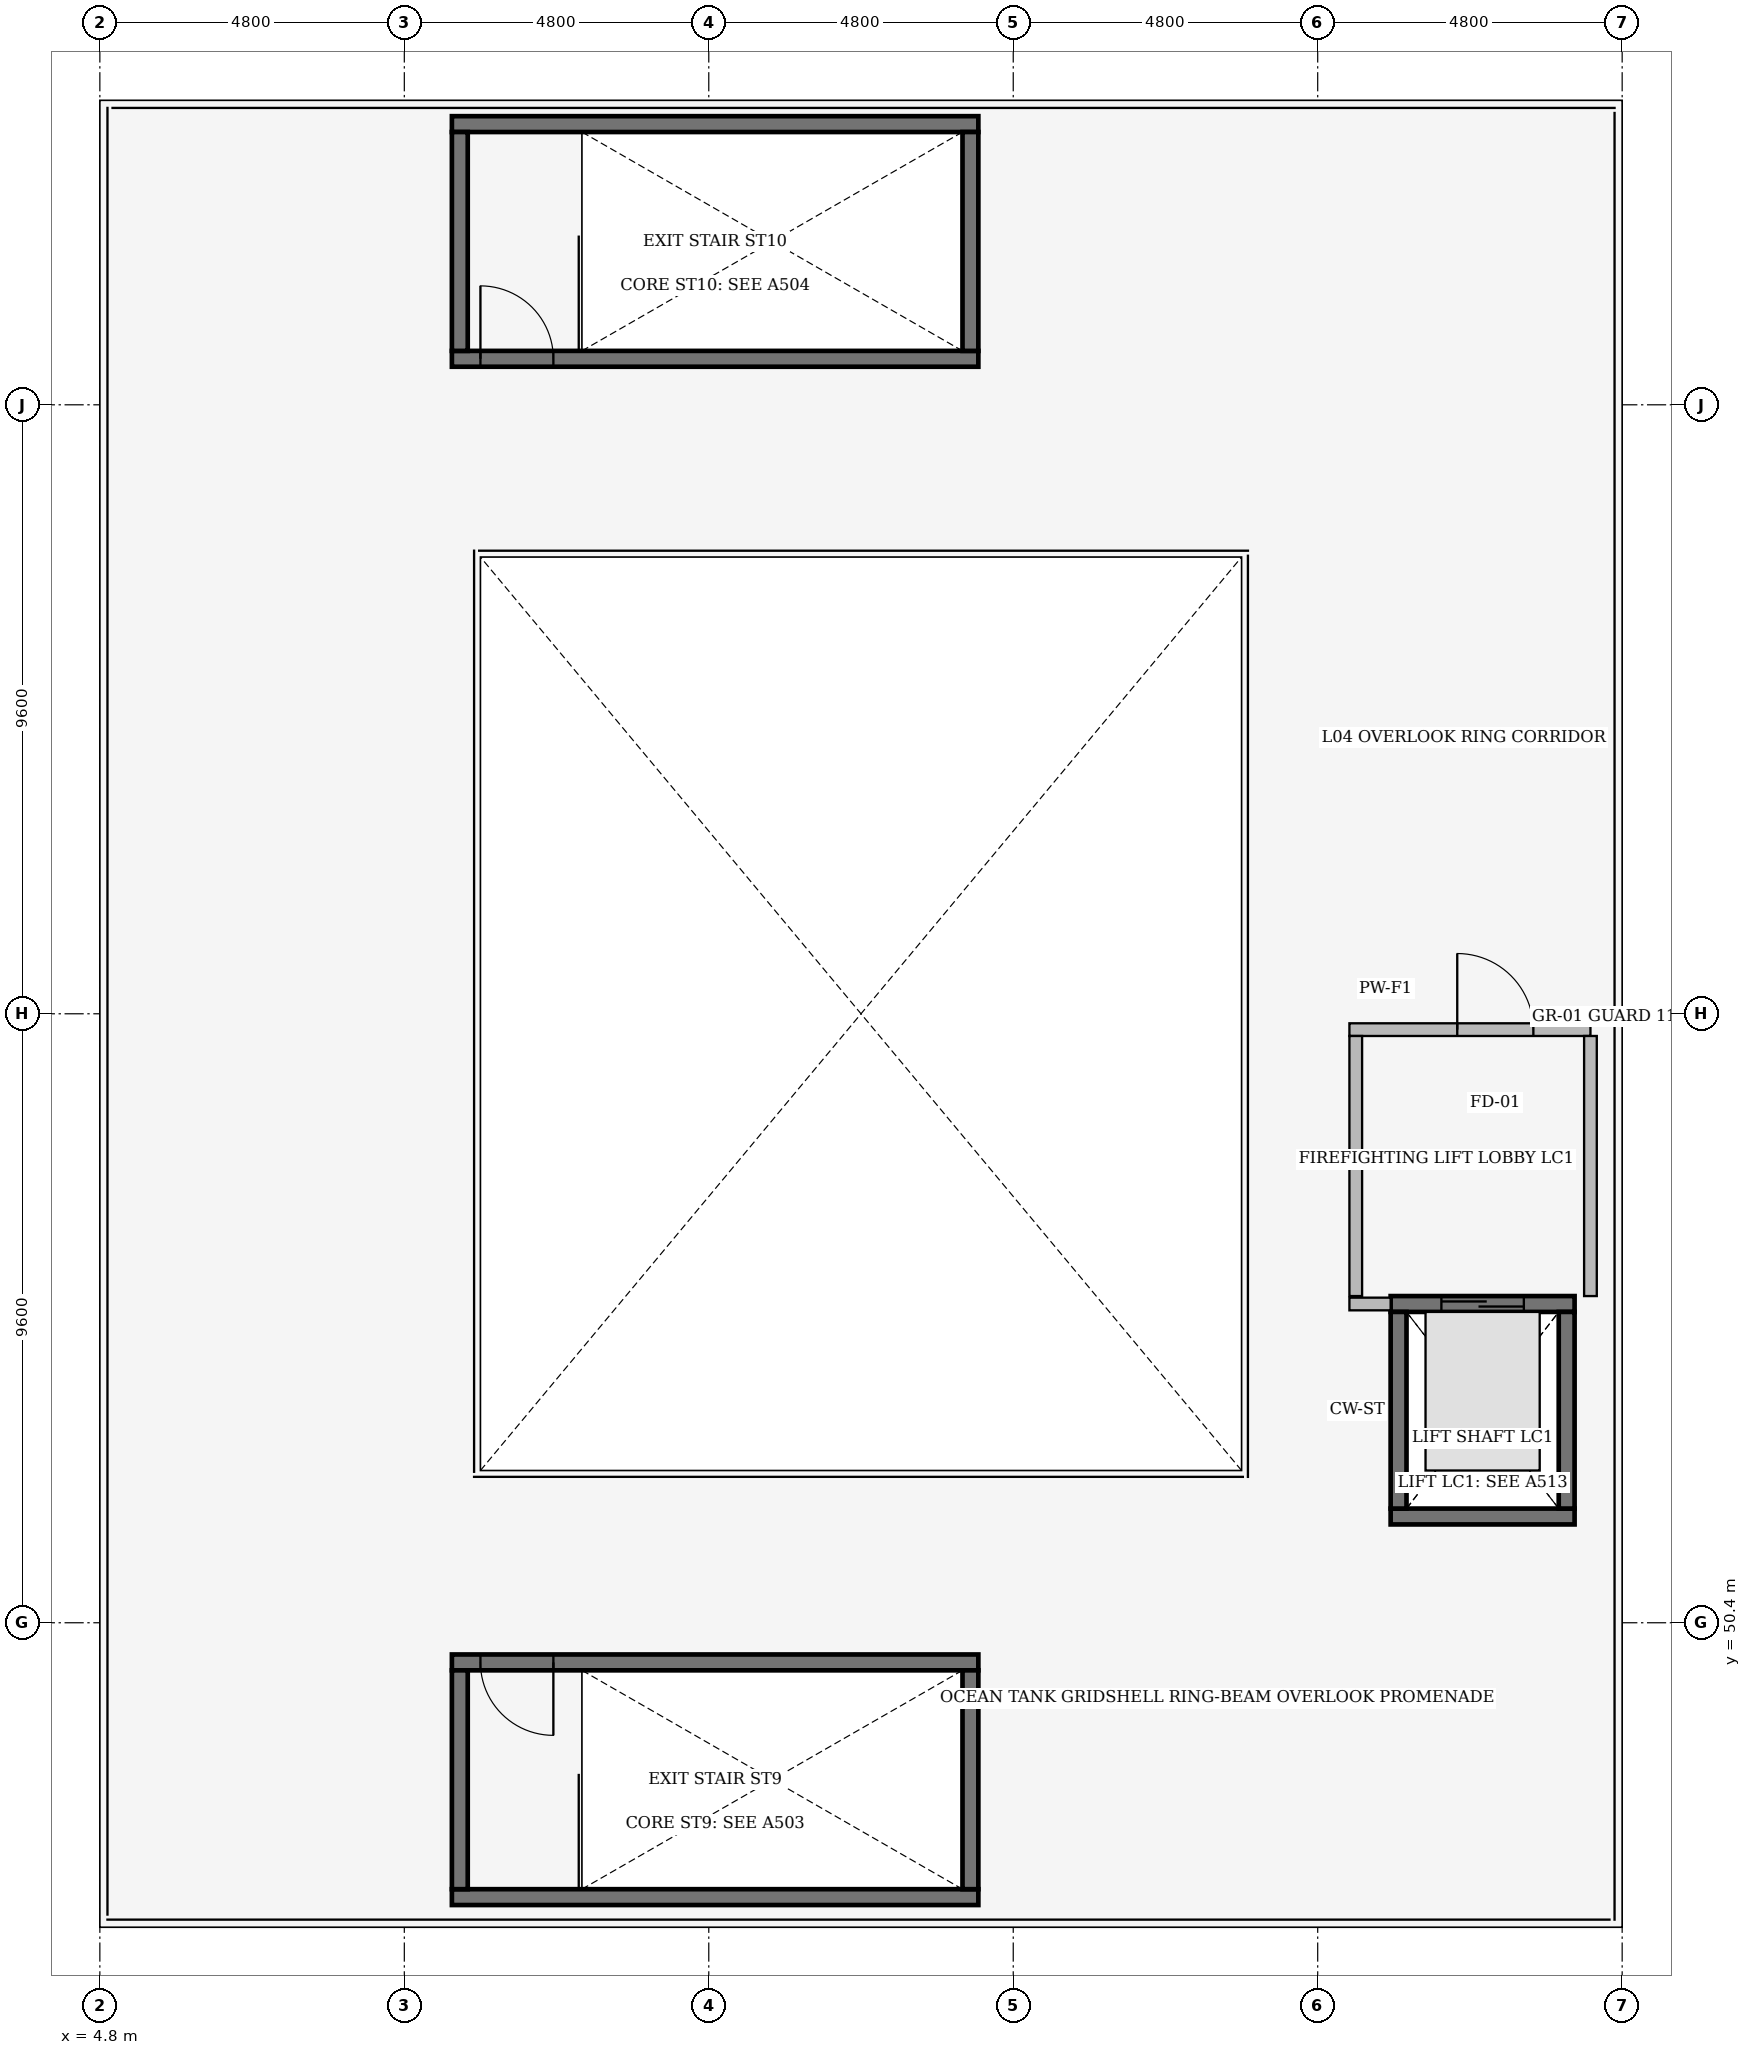
"""IFC4 building model, lengths in metres.
Left out: names, types, materials, properties, quantities, classifications, styles, units other than length and angle.
Written with IfcOpenShell. Run it as: python <this file> out.ifc"""

import sys

from ifc_helpers import new_model, si_unit, direction, frame, frame_2d, origin, place, context, subcontext, project, spatial, rectangle, extrude, element, fill, save


model = new_model("IFC4")
c1 = context("Model", 3, precision=1e-05, world=origin(), true_north=direction((0.0, 1.0)))
c2 = subcontext(c1, "Body", "Model", "MODEL_VIEW")
j1 = project(units=[si_unit("LENGTHUNIT", "METRE"), si_unit("PLANEANGLEUNIT", "RADIAN")], contexts=[c1])
p1 = place(None, origin())
s1 = spatial("IfcSite", under=j1, at=p1, CompositionType="ELEMENT")
p2 = place(p1, origin())
s2 = spatial("IfcBuilding", under=s1, at=p2, CompositionType="ELEMENT")
p3 = place(p2, frame((0.0, 0.0, 19.8)))
s3 = spatial("IfcBuildingStorey", under=s2, at=p3, CompositionType="ELEMENT", Elevation=19.8)
p4 = place(p3, frame((10.35, 46.075, 0.0), z_axis=(0.0, 0.0, 1.0), x_axis=(1.0, 0.0, 0.0)))
e1 = element("IfcWall", 1, at=p4, inside=s3, PredefinedType="SHEAR", context=c2, shape_type="SweptSolid", body=[
    extrude(rectangle(XDim=8.3, YDim=0.25, at=frame_2d((4.15, 0.0))), origin(), (0.0, 0.0, 1.0), 3.6),
])
p5 = place(p3, frame((18.65, 49.775, 0.0), z_axis=(0.0, 0.0, 1.0), x_axis=(-1.0, 0.0, 0.0)))
e2 = element("IfcWall", 2, at=p5, inside=s3, PredefinedType="SHEAR", context=c2, shape_type="SweptSolid", body=[
    extrude(rectangle(XDim=8.3, YDim=0.25, at=frame_2d((4.15, 0.0))), origin(), (0.0, 0.0, 1.0), 3.6),
])
p6 = place(p5, frame((7.85, 0.0, 0.0), z_axis=(0.0, 0.0, 1.0), x_axis=(-1.0, 0.0, 0.0)))
e3 = element("IfcOpeningElement", 3, at=p6, cuts=e2, PredefinedType="OPENING", context=c2, shape_type="SweptSolid", body=[
    extrude(rectangle(XDim=1.15, YDim=2.2, at=frame_2d((0.575, 1.1))), frame((0.0, 0.135, 0.0), z_axis=(0.0, -1.0, 0.0), x_axis=(1.0, 0.0, 0.0)), (0.0, 0.0, 1.0), 0.27),
])
for number, where, z_axis, x_axis in (
    (4, (10.475, 49.65, 0.0), (0.0, 0.0, 1.0), (0.0, -1.0, 0.0)),
    (5, (18.525, 46.2, 0.0), (0.0, 0.0, 1.0), (0.0, 1.0, 0.0)),
):
    element("IfcWall", number, at=place(p3, frame(where, z_axis=z_axis, x_axis=x_axis)), inside=s3, PredefinedType="SHEAR", context=c2, shape_type="SweptSolid", body=[
        extrude(rectangle(XDim=3.45, YDim=0.25, at=frame_2d((1.725, 0.0))), origin(), (0.0, 0.0, 1.0), 3.6),
    ])
p7 = place(p3, frame((10.35, 70.325, 0.0), z_axis=(0.0, 0.0, 1.0), x_axis=(1.0, 0.0, 0.0)))
e6 = element("IfcWall", 6, at=p7, inside=s3, PredefinedType="SHEAR", context=c2, shape_type="SweptSolid", body=[
    extrude(rectangle(XDim=8.3, YDim=0.25, at=frame_2d((4.15, 0.0))), origin(), (0.0, 0.0, 1.0), 3.6),
])
p8 = place(p7, frame((1.6, 0.0, 0.0), z_axis=(0.0, 0.0, 1.0), x_axis=(-1.0, 0.0, 0.0)))
e7 = element("IfcOpeningElement", 7, at=p8, cuts=e6, PredefinedType="OPENING", context=c2, shape_type="SweptSolid", body=[
    extrude(rectangle(XDim=1.15, YDim=2.2, at=frame_2d((0.575, 1.1))), frame((0.0, 0.135, 0.0), z_axis=(0.0, -1.0, 0.0), x_axis=(1.0, 0.0, 0.0)), (0.0, 0.0, 1.0), 0.27),
])
p9 = place(p3, frame((18.65, 74.025, 0.0), z_axis=(0.0, 0.0, 1.0), x_axis=(-1.0, 0.0, 0.0)))
e8 = element("IfcWall", 8, at=p9, inside=s3, PredefinedType="SHEAR", context=c2, shape_type="SweptSolid", body=[
    extrude(rectangle(XDim=8.3, YDim=0.25, at=frame_2d((4.15, 0.0))), origin(), (0.0, 0.0, 1.0), 3.6),
])
for number, where, z_axis, x_axis in (
    (9, (10.475, 73.9, 0.0), (0.0, 0.0, 1.0), (0.0, -1.0, 0.0)),
    (10, (18.525, 70.45, 0.0), (0.0, 0.0, 1.0), (0.0, 1.0, 0.0)),
):
    element("IfcWall", number, at=place(p3, frame(where, z_axis=z_axis, x_axis=x_axis)), inside=s3, PredefinedType="SHEAR", context=c2, shape_type="SweptSolid", body=[
        extrude(rectangle(XDim=3.45, YDim=0.25, at=frame_2d((1.725, 0.0))), origin(), (0.0, 0.0, 1.0), 3.6),
    ])
p10 = place(p3, frame((25.15, 52.075, 0.0), z_axis=(0.0, 0.0, 1.0), x_axis=(1.0, 0.0, 0.0)))
e11 = element("IfcWall", 11, at=p10, inside=s3, PredefinedType="SHEAR", context=c2, shape_type="SweptSolid", body=[
    extrude(rectangle(XDim=2.9, YDim=0.25, at=frame_2d((1.45, 0.0))), origin(), (0.0, 0.0, 1.0), 3.6),
])
p11 = place(p3, frame((25.15, 55.425, 0.0), z_axis=(0.0, 0.0, 1.0), x_axis=(1.0, 0.0, 0.0)))
e12 = element("IfcWall", 12, at=p11, inside=s3, PredefinedType="SHEAR", context=c2, shape_type="SweptSolid", body=[
    extrude(rectangle(XDim=2.9, YDim=0.25, at=frame_2d((1.45, 0.0))), origin(), (0.0, 0.0, 1.0), 3.6),
])
p12 = place(p11, frame((0.8, 0.0, 0.0)))
e13 = element("IfcOpeningElement", 13, at=p12, cuts=e12, PredefinedType="OPENING", context=c2, shape_type="SweptSolid", body=[
    extrude(rectangle(XDim=1.3, YDim=2.2, at=frame_2d((0.65, 1.1))), frame((0.0, 0.135, 0.0), z_axis=(0.0, -1.0, 0.0), x_axis=(1.0, 0.0, 0.0)), (0.0, 0.0, 1.0), 0.27),
])
for number, where, z_axis, x_axis in (
    (14, (25.275, 52.2, 0.0), (0.0, 0.0, 1.0), (0.0, 1.0, 0.0)),
    (15, (27.925, 52.2, 0.0), (0.0, 0.0, 1.0), (0.0, 1.0, 0.0)),
):
    element("IfcWall", number, at=place(p3, frame(where, z_axis=z_axis, x_axis=x_axis)), inside=s3, PredefinedType="SHEAR", context=c2, shape_type="SweptSolid", body=[
        extrude(rectangle(XDim=3.1, YDim=0.25, at=frame_2d((1.55, 0.0))), origin(), (0.0, 0.0, 1.0), 3.6),
    ])
p13 = place(p3, frame((24.5, 59.75, 0.0), z_axis=(0.0, 0.0, 1.0), x_axis=(1.0, 0.0, 0.0)))
e16 = element("IfcWall", 16, at=p13, inside=s3, PredefinedType="PARTITIONING", context=c2, shape_type="SweptSolid", body=[
    extrude(rectangle(XDim=3.8, YDim=0.2, at=frame_2d((1.9, 0.0))), origin(), (0.0, 0.0, 1.0), 3.24),
])
p14 = place(p13, frame((1.7, 0.0, 0.0)))
e17 = element("IfcOpeningElement", 17, at=p14, cuts=e16, PredefinedType="OPENING", context=c2, shape_type="SweptSolid", body=[
    extrude(rectangle(XDim=1.2, YDim=2.2, at=frame_2d((0.6, 1.1))), frame((0.0, 0.11, 0.0), z_axis=(0.0, -1.0, 0.0), x_axis=(1.0, 0.0, 0.0)), (0.0, 0.0, 1.0), 0.22),
])
for number, where, z_axis, x_axis in (
    (18, (24.6, 55.55, 0.0), (0.0, 0.0, 1.0), (0.0, 1.0, 0.0)),
    (19, (28.3, 55.55, 0.0), (0.0, 0.0, 1.0), (0.0, 1.0, 0.0)),
):
    element("IfcWall", number, at=place(p3, frame(where, z_axis=z_axis, x_axis=x_axis)), inside=s3, PredefinedType="PARTITIONING", context=c2, shape_type="SweptSolid", body=[
        extrude(rectangle(XDim=4.1, YDim=0.2, at=frame_2d((2.05, 0.0))), origin(), (0.0, 0.0, 1.0), 3.24),
    ])
p15 = place(p3, frame((24.5, 55.425, 0.0), z_axis=(0.0, 0.0, 1.0), x_axis=(1.0, 0.0, 0.0)))
e20 = element("IfcWall", 20, at=p15, inside=s3, PredefinedType="PARTITIONING", context=c2, shape_type="SweptSolid", body=[
    extrude(rectangle(XDim=0.65, YDim=0.2, at=frame_2d((0.325, 0.0))), origin(), (0.0, 0.0, 1.0), 3.24),
])
p16 = place(p6, origin())
e21 = element("IfcDoor", 21, at=p16, inside=s3, OperationType="SINGLE_SWING_RIGHT", PredefinedType="DOOR", context=c2, shape_type="SweptSolid", body=[
    extrude(rectangle(XDim=1.15, YDim=2.2, at=frame_2d((0.575, 1.1))), frame((0.0, 0.025, 0.0), z_axis=(0.0, -1.0, 0.0), x_axis=(1.0, 0.0, 0.0)), (0.0, 0.0, 1.0), 0.05),
])
fill(e3, e21)
p17 = place(p8, origin())
e22 = element("IfcDoor", 22, at=p17, inside=s3, OperationType="SINGLE_SWING_RIGHT", PredefinedType="DOOR", context=c2, shape_type="SweptSolid", body=[
    extrude(rectangle(XDim=1.15, YDim=2.2, at=frame_2d((0.575, 1.1))), frame((0.0, 0.025, 0.0), z_axis=(0.0, -1.0, 0.0), x_axis=(1.0, 0.0, 0.0)), (0.0, 0.0, 1.0), 0.05),
])
fill(e7, e22)
p18 = place(p12, origin())
e23 = element("IfcDoor", 23, at=p18, inside=s3, OperationType="DOUBLE_DOOR_SLIDING", PredefinedType="DOOR", context=c2, shape_type="SweptSolid", body=[
    extrude(rectangle(XDim=1.3, YDim=2.2, at=frame_2d((0.65, 1.1))), frame((0.0, 0.025, 0.0), z_axis=(0.0, -1.0, 0.0), x_axis=(1.0, 0.0, 0.0)), (0.0, 0.0, 1.0), 0.05),
])
fill(e13, e23)
p19 = place(p14, origin())
e24 = element("IfcDoor", 24, at=p19, inside=s3, OperationType="SINGLE_SWING_LEFT", PredefinedType="DOOR", context=c2, shape_type="SweptSolid", body=[
    extrude(rectangle(XDim=1.2, YDim=2.2, at=frame_2d((0.6, 1.1))), frame((0.0, 0.025, 0.0), z_axis=(0.0, -1.0, 0.0), x_axis=(1.0, 0.0, 0.0)), (0.0, 0.0, 1.0), 0.05),
])
fill(e17, e24)
save(model, sys.argv[1])
